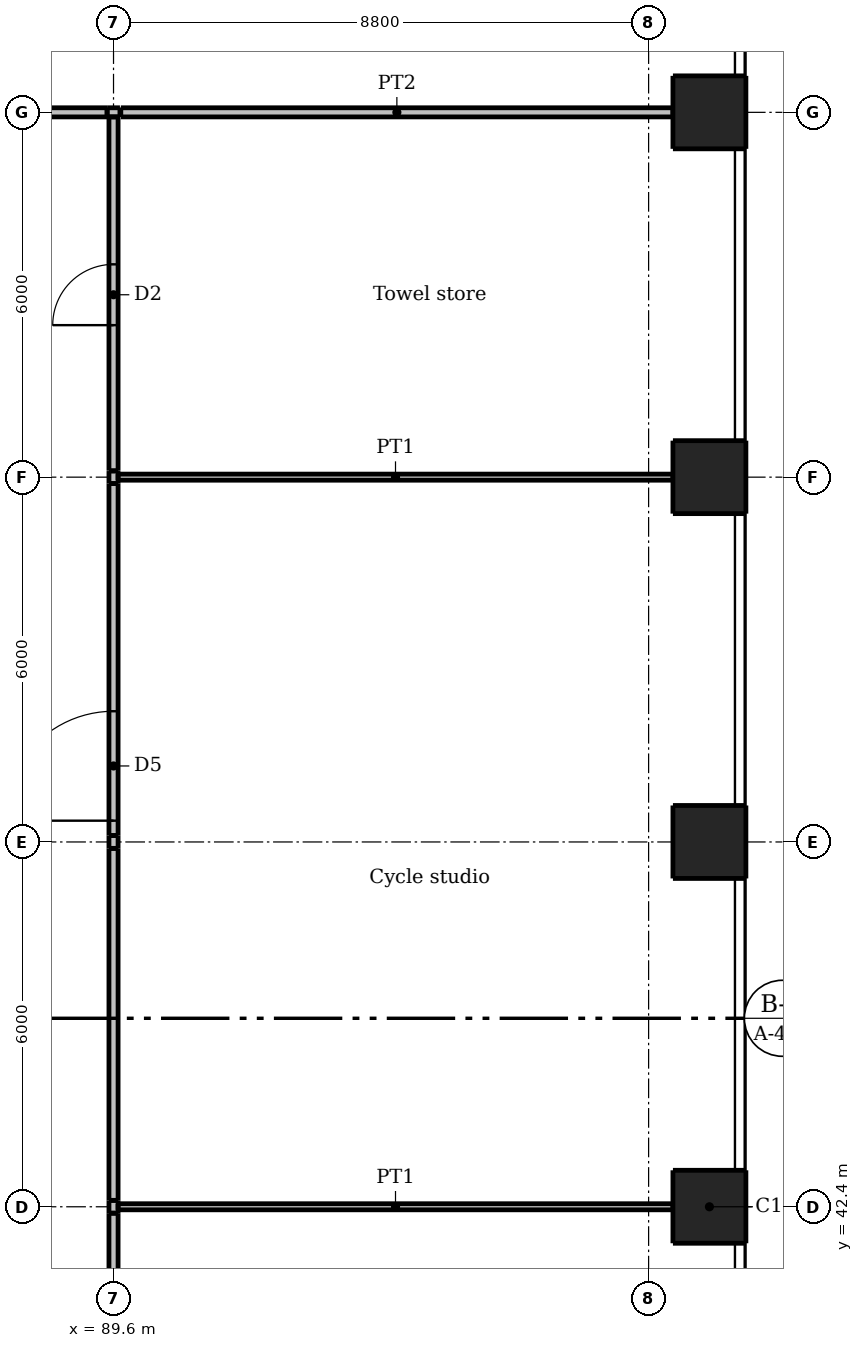
"""IFC4 building model, lengths in metres.
Left out: names, types, materials, properties, quantities, classifications, styles, units other than length and angle.
Written with IfcOpenShell. Run it as: python <this file> out.ifc"""

import sys

from ifc_helpers import new_model, si_unit, direction, frame, frame_2d, origin, origin_2d, place, context, subcontext, project, spatial, rectangle, extrude, element, fill, save


model = new_model("IFC4")
c1 = context("Model", 3, precision=1e-05, world=origin(), true_north=direction((0.0, 1.0)))
c2 = subcontext(c1, "Body", "Model", "MODEL_VIEW")
j1 = project(units=[si_unit("LENGTHUNIT", "METRE"), si_unit("PLANEANGLEUNIT", "RADIAN")], contexts=[c1])
p1 = place(None, origin())
s1 = spatial("IfcSite", under=j1, at=p1, CompositionType="ELEMENT")
p2 = place(p1, origin())
s2 = spatial("IfcBuilding", under=s1, at=p2, CompositionType="ELEMENT")
p3 = place(p2, frame((0.0, 0.0, 10.0)))
s3 = spatial("IfcBuildingStorey", under=s2, at=p3, CompositionType="ELEMENT", Elevation=10.0)
for number, where, z_axis, x_axis in (
    (1, (99.4, 42.4, 0.0), (0.0, 0.0, 1.0), (1.0, 0.0, 0.0)),
    (2, (99.4, 48.4, 0.0), (0.0, 0.0, 1.0), (1.0, 0.0, 0.0)),
    (3, (99.4, 54.4, 0.0), (0.0, 0.0, 1.0), (1.0, 0.0, 0.0)),
    (4, (99.4, 60.4, 0.0), (0.0, 0.0, 1.0), (1.0, 0.0, 0.0)),
):
    element("IfcColumn", number, at=place(p3, frame(where, z_axis=z_axis, x_axis=x_axis)), inside=s3, PredefinedType="COLUMN", context=c2, shape_type="SweptSolid", body=[
        extrude(rectangle(XDim=1.2, YDim=1.2, at=origin_2d()), origin(), (0.0, 0.0, 1.0), 4.2),
    ])
for number, where, z_axis, x_axis in (
    (5, (89.675, 42.4, 0.0), (0.0, 0.0, 1.0), (1.0, 0.0, 0.0)),
    (6, (89.675, 54.4, 0.0), (0.0, 0.0, 1.0), (1.0, 0.0, 0.0)),
):
    element("IfcWall", number, at=place(p3, frame(where, z_axis=z_axis, x_axis=x_axis)), inside=s3, PredefinedType="PARTITIONING", context=c2, shape_type="SweptSolid", body=[
        extrude(rectangle(XDim=9.125, YDim=0.1, at=frame_2d((4.562, 0.0))), origin(), (0.0, 0.0, 1.0), 3.66),
    ])
p4 = place(p3, frame((83.705, 60.4, 0.0), z_axis=(0.0, 0.0, 1.0), x_axis=(1.0, 0.0, 0.0)))
e7 = element("IfcWall", 7, at=p4, inside=s3, PredefinedType="PARTITIONING", context=c2, shape_type="SweptSolid", body=[
    extrude(rectangle(XDim=5.79, YDim=0.15, at=frame_2d((2.895, 0.0))), origin(), (0.0, 0.0, 1.0), 4.2),
])
p5 = place(p4, frame((2.395, 0.0, 0.0)))
e8 = element("IfcOpeningElement", 8, at=p5, cuts=e7, PredefinedType="OPENING", context=c2, shape_type="SweptSolid", body=[
    extrude(rectangle(XDim=1.0, YDim=2.1, at=frame_2d((0.5, 1.05))), frame((0.0, 0.085, 0.0), z_axis=(0.0, -1.0, 0.0), x_axis=(1.0, 0.0, 0.0)), (0.0, 0.0, 1.0), 0.17),
])
p6 = place(p3, frame((89.495, 60.4, 0.0), z_axis=(0.0, 0.0, 1.0), x_axis=(1.0, 0.0, 0.0)))
e9 = element("IfcWall", 9, at=p6, inside=s3, PredefinedType="PARTITIONING", context=c2, shape_type="SweptSolid", body=[
    extrude(rectangle(XDim=0.211, YDim=0.15, at=frame_2d((0.105, 0.0))), origin(), (0.0, 0.0, 1.0), 3.66),
])
p7 = place(p3, frame((89.72, 60.4, 0.0), z_axis=(0.0, 0.0, 1.0), x_axis=(1.0, 0.0, 0.0)))
e10 = element("IfcWall", 10, at=p7, inside=s3, PredefinedType="PARTITIONING", context=c2, shape_type="SweptSolid", body=[
    extrude(rectangle(XDim=9.08, YDim=0.15, at=frame_2d((4.54, 0.0))), origin(), (0.0, 0.0, 1.0), 3.667),
])
p8 = place(p3, frame((89.6, 36.505, 0.0), z_axis=(0.0, 0.0, 1.0), x_axis=(0.0, 1.0, 0.0)))
e11 = element("IfcWall", 11, at=p8, inside=s3, PredefinedType="PARTITIONING", context=c2, shape_type="SweptSolid", body=[
    extrude(rectangle(XDim=5.789, YDim=0.15, at=frame_2d((2.895, 0.0))), origin(), (0.0, 0.0, 1.0), 4.2),
])
p9 = place(p8, frame((0.245, 0.0, 0.0)))
e12 = element("IfcOpeningElement", 12, at=p9, cuts=e11, PredefinedType="OPENING", context=c2, shape_type="SweptSolid", body=[
    extrude(rectangle(XDim=1.8, YDim=2.1, at=frame_2d((0.9, 1.05))), frame((0.0, 0.085, 0.0), z_axis=(0.0, -1.0, 0.0), x_axis=(1.0, 0.0, 0.0)), (0.0, 0.0, 1.0), 0.17),
])
p10 = place(p3, frame((89.6, 42.295, 0.0), z_axis=(0.0, 0.0, 1.0), x_axis=(0.0, 1.0, 0.0)))
e13 = element("IfcWall", 13, at=p10, inside=s3, PredefinedType="PARTITIONING", context=c2, shape_type="SweptSolid", body=[
    extrude(rectangle(XDim=0.211, YDim=0.15, at=frame_2d((0.105, 0.0))), origin(), (0.0, 0.0, 1.0), 3.66),
])
p11 = place(p3, frame((89.6, 42.505, 0.0), z_axis=(0.0, 0.0, 1.0), x_axis=(0.0, 1.0, 0.0)))
e14 = element("IfcWall", 14, at=p11, inside=s3, PredefinedType="PARTITIONING", context=c2, shape_type="SweptSolid", body=[
    extrude(rectangle(XDim=5.789, YDim=0.15, at=frame_2d((2.895, 0.0))), origin(), (0.0, 0.0, 1.0), 4.2),
])
p12 = place(p3, frame((89.6, 48.295, 0.0), z_axis=(0.0, 0.0, 1.0), x_axis=(0.0, 1.0, 0.0)))
e15 = element("IfcWall", 15, at=p12, inside=s3, PredefinedType="PARTITIONING", context=c2, shape_type="SweptSolid", body=[
    extrude(rectangle(XDim=0.211, YDim=0.15, at=frame_2d((0.105, 0.0))), origin(), (0.0, 0.0, 1.0), 3.66),
])
p13 = place(p3, frame((89.6, 48.505, 0.0), z_axis=(0.0, 0.0, 1.0), x_axis=(0.0, 1.0, 0.0)))
e16 = element("IfcWall", 16, at=p13, inside=s3, PredefinedType="PARTITIONING", context=c2, shape_type="SweptSolid", body=[
    extrude(rectangle(XDim=5.789, YDim=0.15, at=frame_2d((2.895, 0.0))), origin(), (0.0, 0.0, 1.0), 4.2),
])
p14 = place(p13, frame((0.245, 0.0, 0.0)))
e17 = element("IfcOpeningElement", 17, at=p14, cuts=e16, PredefinedType="OPENING", context=c2, shape_type="SweptSolid", body=[
    extrude(rectangle(XDim=1.8, YDim=2.1, at=frame_2d((0.9, 1.05))), frame((0.0, 0.085, 0.0), z_axis=(0.0, -1.0, 0.0), x_axis=(1.0, 0.0, 0.0)), (0.0, 0.0, 1.0), 0.17),
])
p15 = place(p3, frame((89.6, 54.295, 0.0), z_axis=(0.0, 0.0, 1.0), x_axis=(0.0, 1.0, 0.0)))
e18 = element("IfcWall", 18, at=p15, inside=s3, PredefinedType="PARTITIONING", context=c2, shape_type="SweptSolid", body=[
    extrude(rectangle(XDim=0.206, YDim=0.15, at=frame_2d((0.103, 0.0))), origin(), (0.0, 0.0, 1.0), 3.66),
])
p16 = place(p3, frame((89.6, 54.505, 0.0), z_axis=(0.0, 0.0, 1.0), x_axis=(0.0, 1.0, 0.0)))
e19 = element("IfcWall", 19, at=p16, inside=s3, PredefinedType="PARTITIONING", context=c2, shape_type="SweptSolid", body=[
    extrude(rectangle(XDim=5.82, YDim=0.15, at=frame_2d((2.91, 0.0))), origin(), (0.0, 0.0, 1.0), 3.66),
])
p17 = place(p16, frame((2.395, 0.0, 0.0)))
e20 = element("IfcOpeningElement", 20, at=p17, cuts=e19, PredefinedType="OPENING", context=c2, shape_type="SweptSolid", body=[
    extrude(rectangle(XDim=1.0, YDim=2.1, at=frame_2d((0.5, 1.05))), frame((0.0, 0.085, 0.0), z_axis=(0.0, -1.0, 0.0), x_axis=(1.0, 0.0, 0.0)), (0.0, 0.0, 1.0), 0.17),
])
p18 = place(p14, origin())
e21 = element("IfcDoor", 21, at=p18, inside=s3, OperationType="DOUBLE_DOOR_SINGLE_SWING", PredefinedType="DOOR", context=c2, shape_type="SweptSolid", body=[
    extrude(rectangle(XDim=1.8, YDim=2.1, at=frame_2d((0.9, 1.05))), frame((0.0, 0.025, 0.0), z_axis=(0.0, -1.0, 0.0), x_axis=(1.0, 0.0, 0.0)), (0.0, 0.0, 1.0), 0.05),
])
fill(e17, e21)
p19 = place(p17, origin())
e22 = element("IfcDoor", 22, at=p19, inside=s3, OperationType="SINGLE_SWING_LEFT", PredefinedType="DOOR", context=c2, shape_type="SweptSolid", body=[
    extrude(rectangle(XDim=1.0, YDim=2.1, at=frame_2d((0.5, 1.05))), frame((0.0, 0.025, 0.0), z_axis=(0.0, -1.0, 0.0), x_axis=(1.0, 0.0, 0.0)), (0.0, 0.0, 1.0), 0.05),
])
fill(e20, e22)
save(model, sys.argv[1])
